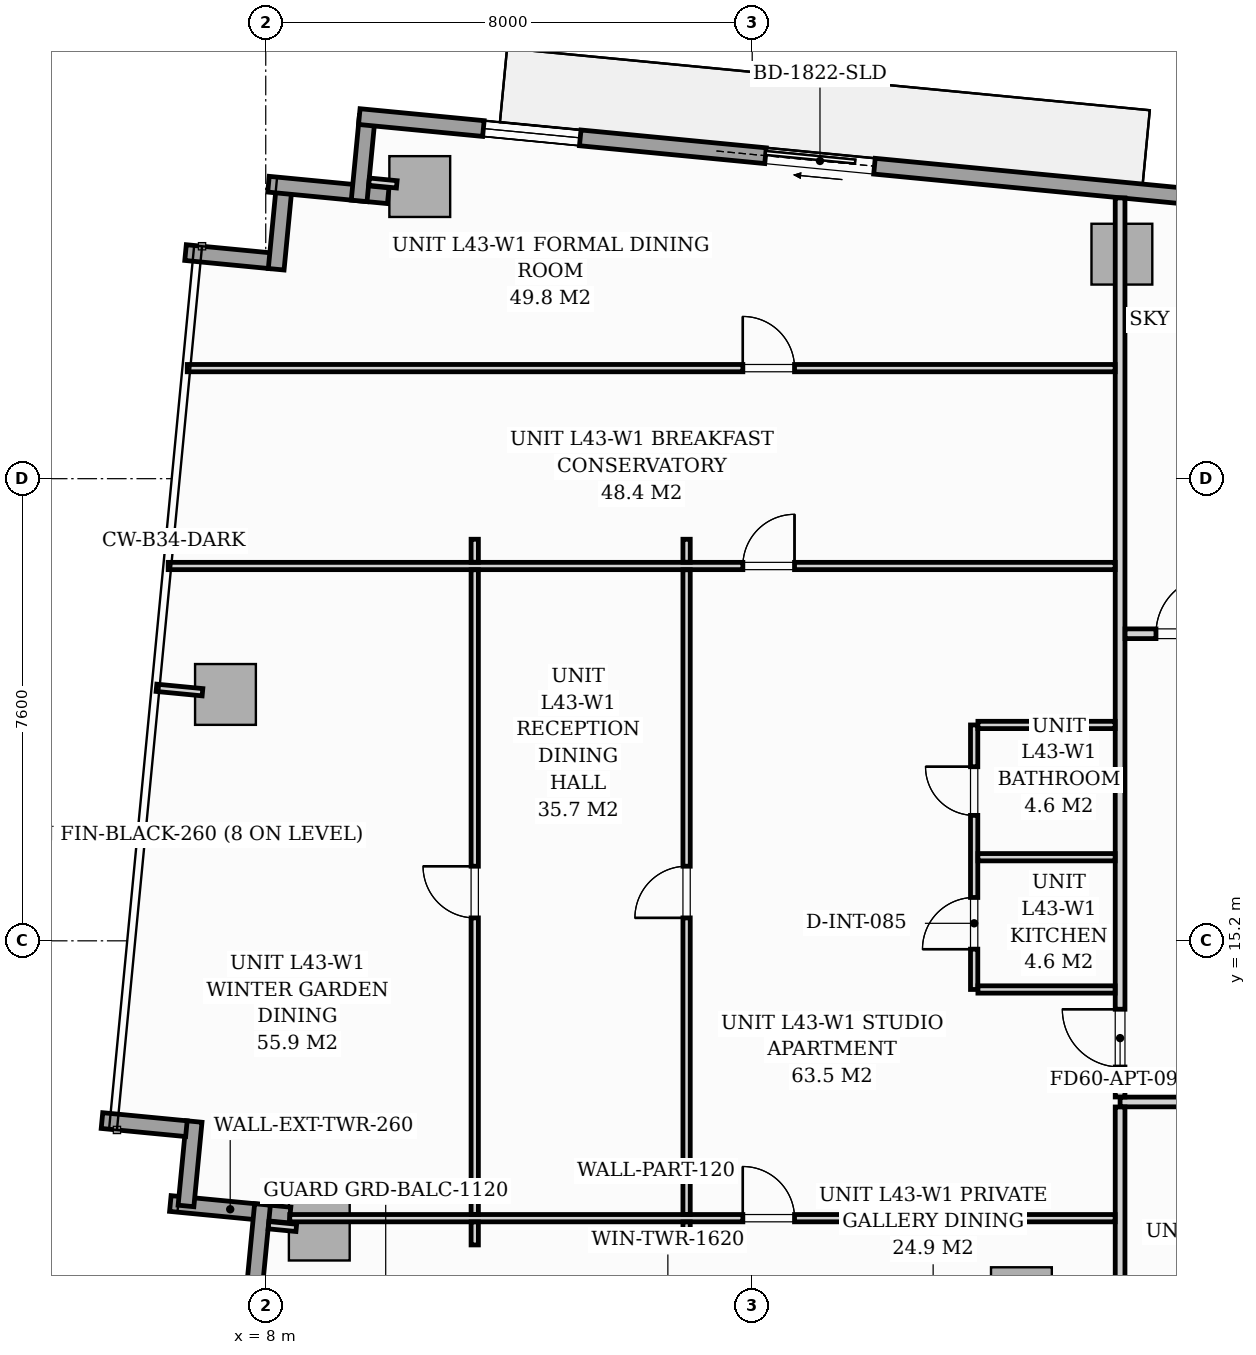
"""IFC4 building model, lengths in metres.
Left out: names, types, materials, properties, quantities, classifications, styles, units other than length and angle.
Written with IfcOpenShell. Run it as: python <this file> out.ifc"""

import sys

from ifc_helpers import new_model, si_unit, direction, frame, frame_2d, origin, origin_2d, place, context, subcontext, project, spatial, rectangle, extrude, source, transform, mapped, element, fill, save


model = new_model("IFC4")
c1 = context("Model", 3, precision=1e-05, world=origin(), true_north=direction((0.0, 1.0)))
c2 = subcontext(c1, "Body", "Model", "MODEL_VIEW")
j1 = project(units=[si_unit("LENGTHUNIT", "METRE"), si_unit("PLANEANGLEUNIT", "RADIAN")], contexts=[c1])
p1 = place(None, origin())
s1 = spatial("IfcSite", under=j1, at=p1, CompositionType="ELEMENT")
p2 = place(p1, origin())
s2 = spatial("IfcBuilding", under=s1, at=p2, CompositionType="ELEMENT")
p3 = place(p2, frame((0.0, 0.0, 150.2)))
s3 = spatial("IfcBuildingStorey", under=s2, at=p3, CompositionType="ELEMENT", Elevation=150.2)
m1 = source(origin(), c2, "Body", "SweptSolid", [
    extrude(rectangle(XDim=1.0, YDim=1.0, at=origin_2d()), origin(), (0.0, 0.0, 1.0), 3.196),
])
for number, where, z_axis, x_axis in (
    (1, (8.881, 10.443, 0.002), (0.0, 0.0, 1.0), (0.995, -0.096, 0.0)),
    (2, (20.427, 9.332, 0.002), (0.0, 0.0, 1.0), (0.995, -0.096, 0.0)),
    (3, (10.533, 27.604, 0.002), (0.0, 0.0, 1.0), (0.995, -0.096, 0.0)),
    (4, (22.08, 26.492, 0.002), (0.0, 0.0, 1.0), (0.995, -0.096, 0.0)),
    (5, (7.338, 19.252, 0.002), (0.0, 0.0, 1.0), (0.995, -0.096, 0.0)),
):
    element("IfcColumn", number, at=place(p3, frame(where, z_axis=z_axis, x_axis=x_axis)), inside=s3, PredefinedType="COLUMN", context=c2, shape_type="MappedRepresentation", body=[
        mapped(m1, transform((0.0, 0.0, 0.0), scale=1.0)),
    ])
p4 = place(p3, frame((8.4, 10.69, 0.0), z_axis=(0.0, 0.0, 1.0), x_axis=(-0.995391147587, 0.095898192396, 0.0)))
e6 = element("IfcWall", 6, at=p4, inside=s3, PredefinedType="STANDARD", context=c2, shape_type="SweptSolid", body=[
    extrude(rectangle(XDim=1.978, YDim=0.26, at=frame_2d((0.989, 0.0))), origin(), (0.0, 0.0, 1.0), 2.94),
])
p5 = place(p3, frame((6.688, 10.84, 0.0), z_axis=(0.0, 0.0, 1.0), x_axis=(0.09589913835, 0.995391056452, 0.0)))
e7 = element("IfcWall", 7, at=p5, inside=s3, PredefinedType="STANDARD", context=c2, shape_type="SweptSolid", body=[
    extrude(rectangle(XDim=1.395, YDim=0.26, at=frame_2d((0.698, 0.0))), origin(), (0.0, 0.0, 1.0), 2.94),
])
for number, where, z_axis, x_axis in (
    (8, (6.695, 12.111, 0.0), (0.0, 0.0, 1.0), (-0.995, 0.096, 0.0)),
    (9, (6.681, 26.518, 0.0), (0.0, 0.0, 1.0), (0.995, -0.096, 0.0)),
):
    element("IfcWall", number, at=place(p3, frame(where, z_axis=z_axis, x_axis=x_axis)), inside=s3, PredefinedType="STANDARD", context=c2, shape_type="SweptSolid", body=[
        extrude(rectangle(XDim=1.395, YDim=0.26, at=frame_2d((0.697, 0.0))), origin(), (0.0, 0.0, 1.0), 2.94),
    ])
p6 = place(p3, frame((8.172, 26.244, 0.0), z_axis=(0.0, 0.0, 1.0), x_axis=(0.095725744959, 0.99540774648, 0.0)))
e10 = element("IfcWall", 10, at=p6, inside=s3, PredefinedType="STANDARD", context=c2, shape_type="SweptSolid", body=[
    extrude(rectangle(XDim=1.395, YDim=0.26, at=frame_2d((0.698, 0.0))), origin(), (0.0, 0.0, 1.0), 2.94),
])
p7 = place(p3, frame((8.045, 27.643, 0.0), z_axis=(0.0, 0.0, 1.0), x_axis=(0.995391147587, -0.095898192396, 0.0)))
e11 = element("IfcWall", 11, at=p7, inside=s3, PredefinedType="STANDARD", context=c2, shape_type="SweptSolid", body=[
    extrude(rectangle(XDim=1.978, YDim=0.26, at=frame_2d((0.989, 0.0))), origin(), (0.0, 0.0, 1.0), 2.94),
])
p8 = place(p3, frame((9.536, 27.368, 0.0), z_axis=(0.0, 0.0, 1.0), x_axis=(0.095915846097, 0.995389446633, 0.0)))
e12 = element("IfcWall", 12, at=p8, inside=s3, PredefinedType="STANDARD", context=c2, shape_type="SweptSolid", body=[
    extrude(rectangle(XDim=1.395, YDim=0.26, at=frame_2d((0.697, 0.0))), origin(), (0.0, 0.0, 1.0), 2.94),
])
p9 = place(p3, frame((9.539, 28.754, 0.0), z_axis=(0.0, 0.0, 1.0), x_axis=(0.995397345886, -0.09583383433, 0.0)))
e13 = element("IfcWall", 13, at=p9, inside=s3, PredefinedType="STANDARD", context=c2, shape_type="SweptSolid", body=[
    extrude(rectangle(XDim=17.01, YDim=0.26, at=frame_2d((8.505, 0.0))), origin(), (0.0, 0.0, 1.0), 2.94),
])
p10 = place(p9, frame((6.711, 0.0, 0.0)))
e14 = element("IfcOpeningElement", 14, at=p10, cuts=e13, PredefinedType="OPENING", context=c2, shape_type="SweptSolid", body=[
    extrude(rectangle(XDim=1.8, YDim=2.06, at=frame_2d((0.9, 1.03))), frame((0.0, 0.14, 0.0), z_axis=(0.0, -1.0, 0.0), x_axis=(1.0, 0.0, 0.0)), (0.0, 0.0, 1.0), 0.28),
])
p11 = place(p9, frame((2.05, 0.0, 0.65)))
e15 = element("IfcOpeningElement", 15, at=p11, cuts=e13, PredefinedType="OPENING", context=c2, shape_type="SweptSolid", body=[
    extrude(rectangle(XDim=1.6, YDim=1.5, at=frame_2d((0.8, 0.75))), frame((0.0, 0.14, 0.0), z_axis=(0.0, -1.0, 0.0), x_axis=(1.0, 0.0, 0.0)), (0.0, 0.0, 1.0), 0.28),
])
p12 = place(p3, frame((7.813, 9.476, 0.0), z_axis=(0.0, 0.0, 1.0), x_axis=(0.095915846097, 0.995389446633, 0.0)))
e16 = element("IfcWall", 16, at=p12, inside=s3, PredefinedType="STANDARD", context=c2, shape_type="SweptSolid", body=[
    extrude(rectangle(XDim=1.395, YDim=0.26, at=frame_2d((0.697, 0.0))), origin(), (0.0, 0.0, 1.0), 2.94),
])
p13 = place(p3, frame((22.05, 12.55, 0.0), z_axis=(0.0, 0.0, 1.0), x_axis=(1.0, 0.0, 0.0)))
e17 = element("IfcWall", 17, at=p13, inside=s3, PredefinedType="PARTITIONING", context=c2, shape_type="SweptSolid", body=[
    extrude(rectangle(XDim=23.83, YDim=0.16, at=frame_2d((11.915, 0.0))), origin(), (0.0, 0.0, 1.0), 2.94),
])
p14 = place(p13, frame((1.873, 0.0, 0.0)))
e18 = element("IfcOpeningElement", 18, at=p14, cuts=e17, PredefinedType="OPENING", context=c2, shape_type="SweptSolid", body=[
    extrude(rectangle(XDim=0.95, YDim=2.06, at=frame_2d((0.475, 1.03))), frame((0.0, 0.09, 0.0), z_axis=(0.0, -1.0, 0.0), x_axis=(1.0, 0.0, 0.0)), (0.0, 0.0, 1.0), 0.18),
])
p15 = place(p13, frame((10.224, 0.0, 0.0)))
e19 = element("IfcOpeningElement", 19, at=p15, cuts=e17, PredefinedType="OPENING", context=c2, shape_type="SweptSolid", body=[
    extrude(rectangle(XDim=0.95, YDim=2.06, at=frame_2d((0.475, 1.03))), frame((0.0, 0.09, 0.0), z_axis=(0.0, -1.0, 0.0), x_axis=(1.0, 0.0, 0.0)), (0.0, 0.0, 1.0), 0.18),
])
p16 = place(p13, frame((21.84, 0.0, 0.0)))
e20 = element("IfcOpeningElement", 20, at=p16, cuts=e17, PredefinedType="OPENING", context=c2, shape_type="SweptSolid", body=[
    extrude(rectangle(XDim=0.95, YDim=2.06, at=frame_2d((0.475, 1.03))), frame((0.0, 0.09, 0.0), z_axis=(0.0, -1.0, 0.0), x_axis=(1.0, 0.0, 0.0)), (0.0, 0.0, 1.0), 0.18),
])
p17 = place(p3, frame((22.05, 8.253, 0.0), z_axis=(0.0, 0.0, 1.0), x_axis=(0.0, 1.0, 0.0)))
e21 = element("IfcWall", 21, at=p17, inside=s3, PredefinedType="PARTITIONING", context=c2, shape_type="SweptSolid", body=[
    extrude(rectangle(XDim=4.215, YDim=0.16, at=frame_2d((2.107, 0.0))), origin(), (0.0, 0.0, 1.0), 2.94),
])
p18 = place(p3, frame((22.05, 12.632, 0.0), z_axis=(0.0, 0.0, 1.0), x_axis=(0.0, 1.0, 0.0)))
e22 = element("IfcWall", 22, at=p18, inside=s3, PredefinedType="PARTITIONING", context=c2, shape_type="SweptSolid", body=[
    extrude(rectangle(XDim=14.785, YDim=0.16, at=frame_2d((7.393, 0.0))), origin(), (0.0, 0.0, 1.0), 2.94),
])
p19 = place(p18, frame((0.493, 0.0, 0.0)))
e23 = element("IfcOpeningElement", 23, at=p19, cuts=e22, PredefinedType="OPENING", context=c2, shape_type="SweptSolid", body=[
    extrude(rectangle(XDim=0.95, YDim=2.06, at=frame_2d((0.475, 1.03))), frame((0.0, 0.09, 0.0), z_axis=(0.0, -1.0, 0.0), x_axis=(1.0, 0.0, 0.0)), (0.0, 0.0, 1.0), 0.18),
])
p20 = place(p3, frame((19.65, 14.4, 0.0), z_axis=(0.0, 0.0, 1.0), x_axis=(0.0, 1.0, 0.0)))
e24 = element("IfcWall", 24, at=p20, inside=s3, PredefinedType="PARTITIONING", context=c2, shape_type="SweptSolid", body=[
    extrude(rectangle(XDim=4.35, YDim=0.12, at=frame_2d((2.175, 0.0))), origin(), (0.0, 0.0, 1.0), 2.94),
])
p21 = place(p20, frame((0.663, 0.0, 0.0)))
e25 = element("IfcOpeningElement", 25, at=p21, cuts=e24, PredefinedType="OPENING", context=c2, shape_type="SweptSolid", body=[
    extrude(rectangle(XDim=0.85, YDim=2.05, at=frame_2d((0.425, 1.025))), frame((0.0, 0.07, 0.0), z_axis=(0.0, -1.0, 0.0), x_axis=(1.0, 0.0, 0.0)), (0.0, 0.0, 1.0), 0.14),
])
p22 = place(p20, frame((2.863, 0.0, 0.0)))
e26 = element("IfcOpeningElement", 26, at=p22, cuts=e24, PredefinedType="OPENING", context=c2, shape_type="SweptSolid", body=[
    extrude(rectangle(XDim=0.8, YDim=2.02, at=frame_2d((0.4, 1.01))), frame((0.0, 0.07, 0.0), z_axis=(0.0, -1.0, 0.0), x_axis=(1.0, 0.0, 0.0)), (0.0, 0.0, 1.0), 0.14),
])
for number, where, z_axis, x_axis in (
    (27, (19.712, 16.575, 0.0), (0.0, 0.0, 1.0), (1.0, 0.0, 0.0)),
    (28, (19.712, 14.4, 0.0), (0.0, 0.0, 1.0), (1.0, 0.0, 0.0)),
    (29, (19.712, 18.75, 0.0), (0.0, 0.0, 1.0), (1.0, 0.0, 0.0)),
):
    element("IfcWall", number, at=place(p3, frame(where, z_axis=z_axis, x_axis=x_axis)), inside=s3, PredefinedType="PARTITIONING", context=c2, shape_type="SweptSolid", body=[
        extrude(rectangle(XDim=2.256, YDim=0.12, at=frame_2d((1.128, 0.0))), origin(), (0.0, 0.0, 1.0), 2.94),
    ])
p23 = place(p3, frame((6.709, 24.618, 0.0), z_axis=(0.0, 0.0, 1.0), x_axis=(1.0, 0.0, 0.0)))
e30 = element("IfcWall", 30, at=p23, inside=s3, PredefinedType="PARTITIONING", context=c2, shape_type="SweptSolid", body=[
    extrude(rectangle(XDim=15.259, YDim=0.12, at=frame_2d((7.629, 0.0))), origin(), (0.0, 0.0, 1.0), 2.94),
])
p24 = place(p23, frame((9.137, 0.0, 0.0)))
e31 = element("IfcOpeningElement", 31, at=p24, cuts=e30, PredefinedType="OPENING", context=c2, shape_type="SweptSolid", body=[
    extrude(rectangle(XDim=0.85, YDim=2.05, at=frame_2d((0.425, 1.025))), frame((0.0, 0.07, 0.0), z_axis=(0.0, -1.0, 0.0), x_axis=(1.0, 0.0, 0.0)), (0.0, 0.0, 1.0), 0.14),
])
p25 = place(p3, frame((6.396, 21.364, 0.0), z_axis=(0.0, 0.0, 1.0), x_axis=(1.0, 0.0, 0.0)))
e32 = element("IfcWall", 32, at=p25, inside=s3, PredefinedType="PARTITIONING", context=c2, shape_type="SweptSolid", body=[
    extrude(rectangle(XDim=15.572, YDim=0.12, at=frame_2d((7.786, 0.0))), origin(), (0.0, 0.0, 1.0), 2.94),
])
p26 = place(p25, frame((9.45, 0.0, 0.0)))
e33 = element("IfcOpeningElement", 33, at=p26, cuts=e32, PredefinedType="OPENING", context=c2, shape_type="SweptSolid", body=[
    extrude(rectangle(XDim=0.85, YDim=2.05, at=frame_2d((0.425, 1.025))), frame((0.0, 0.07, 0.0), z_axis=(0.0, -1.0, 0.0), x_axis=(1.0, 0.0, 0.0)), (0.0, 0.0, 1.0), 0.14),
])
p27 = place(p3, frame((8.395, 10.639, 0.0), z_axis=(0.0, 0.0, 1.0), x_axis=(1.0, 0.0, 0.0)))
e34 = element("IfcWall", 34, at=p27, inside=s3, PredefinedType="PARTITIONING", context=c2, shape_type="SweptSolid", body=[
    extrude(rectangle(XDim=13.573, YDim=0.12, at=frame_2d((6.787, 0.0))), origin(), (0.0, 0.0, 1.0), 2.94),
])
p28 = place(p27, frame((7.451, 0.0, 0.0)))
e35 = element("IfcOpeningElement", 35, at=p28, cuts=e34, PredefinedType="OPENING", context=c2, shape_type="SweptSolid", body=[
    extrude(rectangle(XDim=0.85, YDim=2.05, at=frame_2d((0.425, 1.025))), frame((0.0, 0.07, 0.0), z_axis=(0.0, -1.0, 0.0), x_axis=(1.0, 0.0, 0.0)), (0.0, 0.0, 1.0), 0.14),
])
p29 = place(p3, frame((11.437, 10.199, 0.0), z_axis=(0.0, 0.0, 1.0), x_axis=(0.0, 1.0, 0.0)))
e36 = element("IfcWall", 36, at=p29, inside=s3, PredefinedType="PARTITIONING", context=c2, shape_type="SweptSolid", body=[
    extrude(rectangle(XDim=0.378, YDim=0.12, at=frame_2d((0.189, 0.0))), origin(), (0.0, 0.0, 1.0), 2.94),
])
p30 = place(p3, frame((11.437, 10.701, 0.0), z_axis=(0.0, 0.0, 1.0), x_axis=(0.0, 1.0, 0.0)))
e37 = element("IfcWall", 37, at=p30, inside=s3, PredefinedType="PARTITIONING", context=c2, shape_type="SweptSolid", body=[
    extrude(rectangle(XDim=10.601, YDim=0.12, at=frame_2d((5.301, 0.0))), origin(), (0.0, 0.0, 1.0), 2.94),
])
p31 = place(p30, frame((4.876, 0.0, 0.0)))
e38 = element("IfcOpeningElement", 38, at=p31, cuts=e37, PredefinedType="OPENING", context=c2, shape_type="SweptSolid", body=[
    extrude(rectangle(XDim=0.85, YDim=2.05, at=frame_2d((0.425, 1.025))), frame((0.0, 0.07, 0.0), z_axis=(0.0, -1.0, 0.0), x_axis=(1.0, 0.0, 0.0)), (0.0, 0.0, 1.0), 0.14),
])
for number, where, z_axis, x_axis in (
    (39, (11.437, 21.426, 0.0), (0.0, 0.0, 1.0), (0.0, 1.0, 0.0)),
    (40, (14.921, 10.199, 0.0), (0.0, 0.0, 1.0), (0.0, 1.0, 0.0)),
):
    element("IfcWall", number, at=place(p3, frame(where, z_axis=z_axis, x_axis=x_axis)), inside=s3, PredefinedType="PARTITIONING", context=c2, shape_type="SweptSolid", body=[
        extrude(rectangle(XDim=0.378, YDim=0.12, at=frame_2d((0.189, 0.0))), origin(), (0.0, 0.0, 1.0), 2.94),
    ])
p32 = place(p3, frame((14.921, 10.701, 0.0), z_axis=(0.0, 0.0, 1.0), x_axis=(0.0, 1.0, 0.0)))
e41 = element("IfcWall", 41, at=p32, inside=s3, PredefinedType="PARTITIONING", context=c2, shape_type="SweptSolid", body=[
    extrude(rectangle(XDim=10.601, YDim=0.12, at=frame_2d((5.301, 0.0))), origin(), (0.0, 0.0, 1.0), 2.94),
])
p33 = place(p32, frame((4.876, 0.0, 0.0)))
e42 = element("IfcOpeningElement", 42, at=p33, cuts=e41, PredefinedType="OPENING", context=c2, shape_type="SweptSolid", body=[
    extrude(rectangle(XDim=0.85, YDim=2.05, at=frame_2d((0.425, 1.025))), frame((0.0, 0.07, 0.0), z_axis=(0.0, -1.0, 0.0), x_axis=(1.0, 0.0, 0.0)), (0.0, 0.0, 1.0), 0.14),
])
p34 = place(p3, frame((14.921, 21.426, 0.0), z_axis=(0.0, 0.0, 1.0), x_axis=(0.0, 1.0, 0.0)))
e43 = element("IfcWall", 43, at=p34, inside=s3, PredefinedType="PARTITIONING", context=c2, shape_type="SweptSolid", body=[
    extrude(rectangle(XDim=0.378, YDim=0.12, at=frame_2d((0.189, 0.0))), origin(), (0.0, 0.0, 1.0), 2.94),
])
p35 = place(p3, frame((22.132, 20.25, 0.0), z_axis=(0.0, 0.0, 1.0), x_axis=(1.0, 0.0, 0.0)))
e44 = element("IfcWall", 44, at=p35, inside=s3, PredefinedType="PARTITIONING", context=c2, shape_type="SweptSolid", body=[
    extrude(rectangle(XDim=1.886, YDim=0.16, at=frame_2d((0.943, 0.0))), origin(), (0.0, 0.0, 1.0), 2.94),
])
p36 = place(p35, frame((0.508, 0.0, 0.0)))
e45 = element("IfcOpeningElement", 45, at=p36, cuts=e44, PredefinedType="OPENING", context=c2, shape_type="SweptSolid", body=[
    extrude(rectangle(XDim=0.95, YDim=2.06, at=frame_2d((0.475, 1.03))), frame((0.0, 0.09, 0.0), z_axis=(0.0, -1.0, 0.0), x_axis=(1.0, 0.0, 0.0)), (0.0, 0.0, 1.0), 0.18),
])
for number, where, z_axis, x_axis in (
    (46, (8.502, 10.48, 0.0), (0.0, 0.0, 1.0), (-0.995, 0.096, 0.0)),
    (47, (10.155, 27.64, 0.0), (0.0, 0.0, 1.0), (-0.995, 0.095, 0.0)),
):
    element("IfcWall", number, at=place(p3, frame(where, z_axis=z_axis, x_axis=x_axis)), inside=s3, PredefinedType="PARTITIONING", context=c2, shape_type="SweptSolid", body=[
        extrude(rectangle(XDim=0.458, YDim=0.12, at=frame_2d((0.229, 0.0))), origin(), (0.0, 0.0, 1.0), 2.94),
    ])
p37 = place(p3, frame((6.959, 19.288, 0.0), z_axis=(0.0, 0.0, 1.0), x_axis=(-0.995377786728, 0.096036772582, 0.0)))
e48 = element("IfcWall", 48, at=p37, inside=s3, PredefinedType="PARTITIONING", context=c2, shape_type="SweptSolid", body=[
    extrude(rectangle(XDim=0.76, YDim=0.12, at=frame_2d((0.38, 0.0))), origin(), (0.0, 0.0, 1.0), 2.94),
])
m2 = source(origin(), c2, "Body", "SweptSolid", [
    extrude(rectangle(XDim=1.8, YDim=2.06, at=frame_2d((0.9, 1.03))), frame((0.0, 0.025, 0.0), z_axis=(0.0, -1.0, 0.0), x_axis=(1.0, 0.0, 0.0)), (0.0, 0.0, 1.0), 0.05),
])
p38 = place(p10, origin())
e49 = element("IfcDoor", 49, at=p38, inside=s3, OperationType="SLIDING_TO_LEFT", PredefinedType="DOOR", context=c2, shape_type="MappedRepresentation", body=[
    mapped(m2, transform((0.0, 0.0, 0.0), scale=1.0)),
])
fill(e14, e49)
m3 = source(origin(), c2, "Body", "SweptSolid", [
    extrude(rectangle(XDim=1.6, YDim=1.5, at=frame_2d((0.8, 0.75))), frame((0.0, 0.03, 0.0), z_axis=(0.0, -1.0, 0.0), x_axis=(1.0, 0.0, 0.0)), (0.0, 0.0, 1.0), 0.06),
])
p39 = place(p11, origin())
e50 = element("IfcWindow", 50, at=p39, inside=s3, PartitioningType="SINGLE_PANEL", PredefinedType="WINDOW", context=c2, shape_type="MappedRepresentation", body=[
    mapped(m3, transform((0.0, 0.0, 0.0), scale=1.0)),
])
fill(e15, e50)
m4 = source(origin(), c2, "Body", "SweptSolid", [
    extrude(rectangle(XDim=0.95, YDim=2.06, at=frame_2d((0.475, 1.03))), frame((0.0, 0.025, 0.0), z_axis=(0.0, -1.0, 0.0), x_axis=(1.0, 0.0, 0.0)), (0.0, 0.0, 1.0), 0.05),
])
p40 = place(p19, origin())
e51 = element("IfcDoor", 51, at=p40, inside=s3, OperationType="SINGLE_SWING_RIGHT", PredefinedType="DOOR", context=c2, shape_type="MappedRepresentation", body=[
    mapped(m4, transform((0.0, 0.0, 0.0), scale=1.0)),
])
fill(e23, e51)
m5 = source(origin(), c2, "Body", "SweptSolid", [
    extrude(rectangle(XDim=0.85, YDim=2.05, at=frame_2d((0.425, 1.025))), frame((0.0, 0.025, 0.0), z_axis=(0.0, -1.0, 0.0), x_axis=(1.0, 0.0, 0.0)), (0.0, 0.0, 1.0), 0.05),
])
p41 = place(p21, origin())
e52 = element("IfcDoor", 52, at=p41, inside=s3, OperationType="SINGLE_SWING_LEFT", PredefinedType="DOOR", context=c2, shape_type="MappedRepresentation", body=[
    mapped(m5, transform((0.0, 0.0, 0.0), scale=1.0)),
])
fill(e25, e52)
m6 = source(origin(), c2, "Body", "SweptSolid", [
    extrude(rectangle(XDim=0.8, YDim=2.02, at=frame_2d((0.4, 1.01))), frame((0.0, 0.025, 0.0), z_axis=(0.0, -1.0, 0.0), x_axis=(1.0, 0.0, 0.0)), (0.0, 0.0, 1.0), 0.05),
])
p42 = place(p22, origin())
e53 = element("IfcDoor", 53, at=p42, inside=s3, OperationType="SINGLE_SWING_RIGHT", PredefinedType="DOOR", context=c2, shape_type="MappedRepresentation", body=[
    mapped(m6, transform((0.0, 0.0, 0.0), scale=1.0)),
])
fill(e26, e53)
p43 = place(p24, origin())
e54 = element("IfcDoor", 54, at=p43, inside=s3, OperationType="SINGLE_SWING_LEFT", PredefinedType="DOOR", context=c2, shape_type="MappedRepresentation", body=[
    mapped(m5, transform((0.0, 0.0, 0.0), scale=1.0)),
])
fill(e31, e54)
p44 = place(p26, origin())
e55 = element("IfcDoor", 55, at=p44, inside=s3, OperationType="SINGLE_SWING_RIGHT", PredefinedType="DOOR", context=c2, shape_type="MappedRepresentation", body=[
    mapped(m5, transform((0.0, 0.0, 0.0), scale=1.0)),
])
fill(e33, e55)
p45 = place(p28, origin())
e56 = element("IfcDoor", 56, at=p45, inside=s3, OperationType="SINGLE_SWING_LEFT", PredefinedType="DOOR", context=c2, shape_type="MappedRepresentation", body=[
    mapped(m5, transform((0.0, 0.0, 0.0), scale=1.0)),
])
fill(e35, e56)
p46 = place(p31, origin())
e57 = element("IfcDoor", 57, at=p46, inside=s3, OperationType="SINGLE_SWING_RIGHT", PredefinedType="DOOR", context=c2, shape_type="MappedRepresentation", body=[
    mapped(m5, transform((0.0, 0.0, 0.0), scale=1.0)),
])
fill(e38, e57)
p47 = place(p33, origin())
e58 = element("IfcDoor", 58, at=p47, inside=s3, OperationType="SINGLE_SWING_LEFT", PredefinedType="DOOR", context=c2, shape_type="MappedRepresentation", body=[
    mapped(m5, transform((0.0, 0.0, 0.0), scale=1.0)),
])
fill(e42, e58)
p48 = place(p36, origin())
e59 = element("IfcDoor", 59, at=p48, inside=s3, OperationType="SINGLE_SWING_RIGHT", PredefinedType="DOOR", context=c2, shape_type="MappedRepresentation", body=[
    mapped(m4, transform((0.0, 0.0, 0.0), scale=1.0)),
])
fill(e45, e59)
save(model, sys.argv[1])
